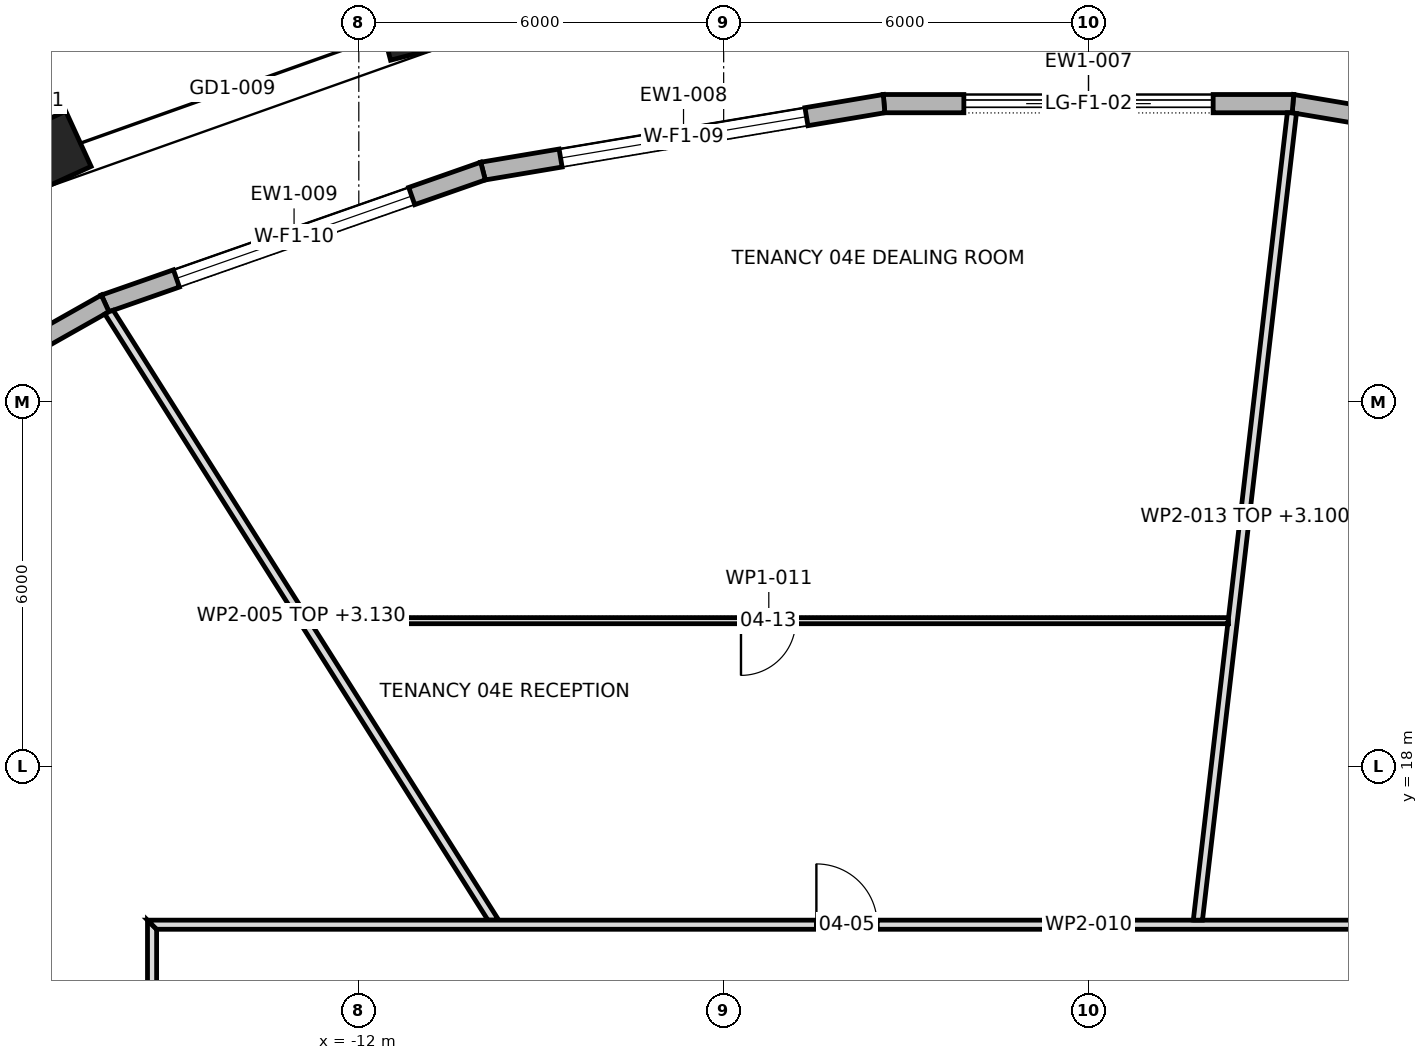
"""IFC4 building model, lengths in metres.
Left out: names, types, materials, properties, quantities, classifications, styles, units other than length and angle.
Written with IfcOpenShell. Run it as: python <this file> out.ifc"""

import sys

from ifc_helpers import new_model, si_unit, direction, frame, frame_2d, origin, origin_2d, place, context, subcontext, project, spatial, polyline, rectangle, outline, extrude, element, fill, save


model = new_model("IFC4")
c1 = context("Model", 3, precision=1e-05, world=origin(), true_north=direction((0.0, 1.0)))
c2 = subcontext(c1, "Body", "Model", "MODEL_VIEW")
j1 = project(units=[si_unit("LENGTHUNIT", "METRE"), si_unit("PLANEANGLEUNIT", "RADIAN")], contexts=[c1])
p1 = place(None, origin())
s1 = spatial("IfcSite", under=j1, at=p1, CompositionType="ELEMENT")
p2 = place(p1, origin())
s2 = spatial("IfcBuilding", under=s1, at=p2, CompositionType="ELEMENT")
p3 = place(p2, frame((0.0, 0.0, 61.3)))
s3 = spatial("IfcBuildingStorey", under=s2, at=p3, CompositionType="ELEMENT", Elevation=61.3)
for number, where, z_axis, x_axis in (
    (1, (-10.733, 30.327, 0.0), (0.0, 0.0, 1.0), (-0.968, -0.252, 0.0)),
    (2, (-17.429, 27.95, 0.0), (0.0, 0.0, 1.0), (-0.909, -0.417, 0.0)),
):
    element("IfcColumn", number, at=place(p3, frame(where, z_axis=z_axis, x_axis=x_axis)), inside=s3, PredefinedType="COLUMN", context=c2, shape_type="SweptSolid", body=[
        extrude(rectangle(XDim=1.8, YDim=1.0, at=origin_2d()), origin(), (0.0, 0.0, 1.0), 4.2),
    ])
p4 = place(p3, frame((9.958, 27.793, 0.0), z_axis=(0.0, 0.0, 1.0), x_axis=(-0.986153133093, 0.165837263877, 0.0)))
e3 = element("IfcWall", 3, at=p4, inside=s3, PredefinedType="STANDARD", context=c2, shape_type="SweptSolid", body=[
    extrude(outline(polyline([(-0.013, -0.15), (6.7, -0.15), (6.676, 0.15), (0.013, 0.15), (-0.013, -0.15)])), origin(), (0.0, 0.0, 1.0), 3.9),
])
p5 = place(p4, frame((1.294, 0.0, 0.6)))
e4 = element("IfcOpeningElement", 4, at=p5, cuts=e3, PredefinedType="OPENING", context=c2, shape_type="SweptSolid", body=[
    extrude(rectangle(XDim=4.1, YDim=2.85, at=frame_2d((2.05, 1.425))), frame((0.0, 0.162, 0.0), z_axis=(0.0, -1.0, 0.0), x_axis=(1.0, 0.0, 0.0)), (0.0, 0.0, 1.0), 0.324),
])
p6 = place(p3, frame((3.362, 28.903, 0.0), z_axis=(0.0, 0.0, 1.0), x_axis=(-1.0, 0.0, 0.0)))
e5 = element("IfcWall", 5, at=p6, inside=s3, PredefinedType="STANDARD", context=c2, shape_type="SweptSolid", body=[
    extrude(outline(polyline([(-0.012, -0.15), (6.737, -0.15), (6.712, 0.15), (0.012, 0.15), (-0.012, -0.15)])), origin(), (0.0, 0.0, 1.0), 3.9),
])
p7 = place(p6, frame((1.312, 0.0, 0.0)))
e6 = element("IfcOpeningElement", 6, at=p7, cuts=e5, PredefinedType="OPENING", context=c2, shape_type="SweptSolid", body=[
    extrude(rectangle(XDim=4.1, YDim=3.45, at=frame_2d((2.05, 1.725))), frame((0.0, 0.162, 0.0), z_axis=(0.0, -1.0, 0.0), x_axis=(1.0, 0.0, 0.0)), (0.0, 0.0, 1.0), 0.324),
])
p8 = place(p3, frame((-3.362, 28.903, 0.0), z_axis=(0.0, 0.0, 1.0), x_axis=(-0.986153133093, -0.165837263877, 0.0)))
e7 = element("IfcWall", 7, at=p8, inside=s3, PredefinedType="STANDARD", context=c2, shape_type="SweptSolid", body=[
    extrude(outline(polyline([(-0.012, -0.15), (6.701, -0.15), (6.675, 0.15), (0.012, 0.15), (-0.012, -0.15)])), origin(), (0.0, 0.0, 1.0), 3.9),
])
p9 = place(p8, frame((1.294, 0.0, 0.6)))
e8 = element("IfcOpeningElement", 8, at=p9, cuts=e7, PredefinedType="OPENING", context=c2, shape_type="SweptSolid", body=[
    extrude(rectangle(XDim=4.1, YDim=2.85, at=frame_2d((2.05, 1.425))), frame((0.0, 0.162, 0.0), z_axis=(0.0, -1.0, 0.0), x_axis=(1.0, 0.0, 0.0)), (0.0, 0.0, 1.0), 0.324),
])
p10 = place(p3, frame((-9.958, 27.793, 0.0), z_axis=(0.0, 0.0, 1.0), x_axis=(-0.94380689486, -0.330497420889, 0.0)))
e9 = element("IfcWall", 9, at=p10, inside=s3, PredefinedType="STANDARD", context=c2, shape_type="SweptSolid", body=[
    extrude(outline(polyline([(-0.013, -0.15), (6.597, -0.15), (6.571, 0.15), (0.013, 0.15), (-0.013, -0.15)])), origin(), (0.0, 0.0, 1.0), 3.9),
])
p11 = place(p10, frame((1.242, 0.0, 0.6)))
e10 = element("IfcOpeningElement", 10, at=p11, cuts=e9, PredefinedType="OPENING", context=c2, shape_type="SweptSolid", body=[
    extrude(rectangle(XDim=4.1, YDim=2.85, at=frame_2d((2.05, 1.425))), frame((0.0, 0.162, 0.0), z_axis=(0.0, -1.0, 0.0), x_axis=(1.0, 0.0, 0.0)), (0.0, 0.0, 1.0), 0.324),
])
p12 = place(p3, frame((-16.172, 25.617, 0.0), z_axis=(0.0, 0.0, 1.0), x_axis=(-0.870673928577, -0.491860661262, 0.0)))
e11 = element("IfcWall", 11, at=p12, inside=s3, PredefinedType="STANDARD", context=c2, shape_type="SweptSolid", body=[
    extrude(outline(polyline([(-0.013, -0.15), (6.439, -0.15), (6.411, 0.15), (0.013, 0.15), (-0.013, -0.15)])), origin(), (0.0, 0.0, 1.0), 3.9),
])
p13 = place(p12, frame((1.163, 0.0, 0.6)))
e12 = element("IfcOpeningElement", 12, at=p13, cuts=e11, PredefinedType="OPENING", context=c2, shape_type="SweptSolid", body=[
    extrude(rectangle(XDim=4.1, YDim=2.85, at=frame_2d((2.05, 1.425))), frame((0.0, 0.162, 0.0), z_axis=(0.0, -1.0, 0.0), x_axis=(1.0, 0.0, 0.0)), (0.0, 0.0, 1.0), 0.324),
])
p14 = place(p3, frame((-16.113, 25.482, 0.0), z_axis=(0.0, 0.0, 1.0), x_axis=(0.534334526362, -0.845273100209, 0.0)))
e13 = element("IfcWall", 13, at=p14, inside=s3, PredefinedType="PARTITIONING", context=c2, shape_type="SweptSolid", body=[
    extrude(outline(polyline([(0.0, -0.075), (1.965, -0.075), (3.93, -0.075), (5.896, -0.075), (7.861, -0.075), (9.826, -0.075), (11.791, -0.075), (11.886, 0.075), (11.886, 0.075), (9.964, 0.075), (8.041, 0.075), (6.119, 0.075), (6.118, 0.073), (6.115, 0.075), (4.591, 0.075), (3.068, 0.075), (1.544, 0.075), (0.02, 0.075), (0.003, 0.002), (0.0, -0.069), (0.0, -0.075)])), origin(), (0.0, 0.0, 1.0), 3.13),
])
p15 = place(p3, frame((-15.4, -2.12, 0.0), z_axis=(0.0, 0.0, 1.0), x_axis=(0.0, 1.0, 0.0)))
e14 = element("IfcWall", 14, at=p15, inside=s3, PredefinedType="PARTITIONING", context=c2, shape_type="SweptSolid", body=[
    extrude(outline(polyline([(0.0, -0.075), (1.938, -0.075), (3.877, -0.075), (5.815, -0.075), (7.753, -0.075), (9.692, -0.075), (11.63, -0.075), (13.568, -0.075), (15.507, -0.075), (17.445, -0.075), (17.595, 0.075), (15.64, 0.075), (13.685, 0.075), (11.73, 0.075), (9.775, 0.075), (7.82, 0.075), (5.865, 0.075), (3.91, 0.075), (1.955, 0.075), (0.0, 0.075), (0.0, -0.075)])), origin(), (0.0, 0.0, 1.0), 3.9),
])
p16 = place(p15, frame((12.4, 0.0, 0.0)))
e15 = element("IfcOpeningElement", 15, at=p16, cuts=e14, PredefinedType="OPENING", context=c2, shape_type="SweptSolid", body=[
    extrude(rectangle(XDim=1.8, YDim=2.1, at=frame_2d((0.9, 1.05))), frame((0.0, 0.087, 0.0), z_axis=(0.0, -1.0, 0.0), x_axis=(1.0, 0.0, 0.0)), (0.0, 0.0, 1.0), 0.174),
])
p17 = place(p15, frame((4.04, 0.0, 0.0)))
e16 = element("IfcOpeningElement", 16, at=p17, cuts=e14, PredefinedType="OPENING", context=c2, shape_type="SweptSolid", body=[
    extrude(rectangle(XDim=1.0, YDim=2.1, at=frame_2d((0.5, 1.05))), frame((0.0, 0.087, 0.0), z_axis=(0.0, -1.0, 0.0), x_axis=(1.0, 0.0, 0.0)), (0.0, 0.0, 1.0), 0.174),
])
p18 = place(p3, frame((-15.475, 15.4, 0.0), z_axis=(0.0, 0.0, 1.0), x_axis=(1.0, 0.0, 0.0)))
e17 = element("IfcWall", 17, at=p18, inside=s3, PredefinedType="PARTITIONING", context=c2, shape_type="SweptSolid", body=[
    extrude(outline(polyline([(0.15, -0.075), (2.066, -0.075), (3.981, -0.075), (5.897, -0.075), (7.812, -0.075), (9.728, -0.075), (11.644, -0.075), (13.56, -0.075), (15.475, -0.075), (17.391, -0.075), (19.306, -0.075), (21.222, -0.075), (23.138, -0.075), (25.053, -0.075), (26.969, -0.075), (28.885, -0.075), (30.8, -0.075), (30.95, 0.075), (29.016, 0.075), (27.081, 0.075), (25.147, 0.075), (23.212, 0.075), (21.278, 0.075), (19.344, 0.075), (17.409, 0.075), (15.475, 0.075), (13.541, 0.075), (11.606, 0.075), (9.672, 0.075), (7.738, 0.075), (5.803, 0.075), (3.869, 0.075), (1.935, 0.075), (0.0, 0.075), (0.15, -0.075)])), origin(), (0.0, 0.0, 1.0), 3.9),
])
p19 = place(p18, frame((22.945, 0.0, 0.0)))
e18 = element("IfcOpeningElement", 18, at=p19, cuts=e17, PredefinedType="OPENING", context=c2, shape_type="SweptSolid", body=[
    extrude(rectangle(XDim=1.8, YDim=2.1, at=frame_2d((0.9, 1.05))), frame((0.0, 0.087, 0.0), z_axis=(0.0, -1.0, 0.0), x_axis=(1.0, 0.0, 0.0)), (0.0, 0.0, 1.0), 0.174),
])
p20 = place(p18, frame((11.0, 0.0, 0.0)))
e19 = element("IfcOpeningElement", 19, at=p20, cuts=e17, PredefinedType="OPENING", context=c2, shape_type="SweptSolid", body=[
    extrude(rectangle(XDim=1.0, YDim=2.1, at=frame_2d((0.5, 1.05))), frame((0.0, 0.087, 0.0), z_axis=(0.0, -1.0, 0.0), x_axis=(1.0, 0.0, 0.0)), (0.0, 0.0, 1.0), 0.174),
])
p21 = place(p3, frame((-12.843, 20.4, 0.0), z_axis=(0.0, 0.0, 1.0), x_axis=(1.0, 0.0, 0.0)))
e20 = element("IfcWall", 20, at=p21, inside=s3, PredefinedType="PARTITIONING", context=c2, shape_type="SweptSolid", body=[
    extrude(outline(polyline([(0.063, -0.05), (1.947, -0.05), (3.831, -0.05), (5.714, -0.05), (7.598, -0.05), (9.482, -0.05), (11.366, -0.05), (13.25, -0.05), (15.134, -0.05), (15.146, 0.049), (15.146, 0.05), (13.252, 0.05), (11.359, 0.05), (9.466, 0.05), (7.573, 0.05), (5.68, 0.05), (3.786, 0.05), (1.893, 0.05), (0.0, 0.05), (0.0, 0.049), (0.063, -0.05)])), origin(), (0.0, 0.0, 1.0), 3.9),
])
p22 = place(p21, frame((7.128, 0.0, 0.0)))
e21 = element("IfcOpeningElement", 21, at=p22, cuts=e20, PredefinedType="OPENING", context=c2, shape_type="SweptSolid", body=[
    extrude(rectangle(XDim=0.9, YDim=2.1, at=frame_2d((0.45, 1.05))), frame((0.0, 0.062, 0.0), z_axis=(0.0, -1.0, 0.0), x_axis=(1.0, 0.0, 0.0)), (0.0, 0.0, 1.0), 0.124),
])
p23 = place(p3, frame((1.798, 15.467, 0.0), z_axis=(0.0, 0.0, 1.0), x_axis=(0.115693975805, 0.993284905736, 0.0)))
e22 = element("IfcWall", 22, at=p23, inside=s3, PredefinedType="PARTITIONING", context=c2, shape_type="SweptSolid", body=[
    extrude(outline(polyline([(13.373, -0.075), (13.373, 0.028), (13.367, 0.075), (11.695, 0.075), (10.022, 0.075), (8.35, 0.075), (6.678, 0.075), (5.005, 0.075), (4.909, 0.064), (4.908, 0.075), (3.272, 0.075), (1.636, 0.075), (0.0, 0.075), (0.0, 0.073), (0.017, -0.075), (1.925, -0.075), (3.833, -0.075), (5.741, -0.075), (7.649, -0.075), (9.557, -0.075), (11.465, -0.075), (13.373, -0.075)])), origin(), (0.0, 0.0, 1.0), 3.1),
])
p24 = place(p7, origin())
e23 = element("IfcDoor", 23, at=p24, inside=s3, OperationType="DOUBLE_DOOR_SLIDING", PredefinedType="DOOR", context=c2, shape_type="SweptSolid", body=[
    extrude(rectangle(XDim=4.1, YDim=3.45, at=frame_2d((2.05, 1.725))), frame((0.0, 0.025, 0.0), z_axis=(0.0, -1.0, 0.0), x_axis=(1.0, 0.0, 0.0)), (0.0, 0.0, 1.0), 0.05),
])
fill(e6, e23)
p25 = place(p9, origin())
e24 = element("IfcWindow", 24, at=p25, inside=s3, PartitioningType="TRIPLE_PANEL_VERTICAL", PredefinedType="WINDOW", context=c2, shape_type="SweptSolid", body=[
    extrude(rectangle(XDim=4.1, YDim=2.85, at=frame_2d((2.05, 1.425))), frame((0.0, 0.03, 0.0), z_axis=(0.0, -1.0, 0.0), x_axis=(1.0, 0.0, 0.0)), (0.0, 0.0, 1.0), 0.06),
])
fill(e8, e24)
p26 = place(p11, origin())
e25 = element("IfcWindow", 25, at=p26, inside=s3, PartitioningType="TRIPLE_PANEL_VERTICAL", PredefinedType="WINDOW", context=c2, shape_type="SweptSolid", body=[
    extrude(rectangle(XDim=4.1, YDim=2.85, at=frame_2d((2.05, 1.425))), frame((0.0, 0.03, 0.0), z_axis=(0.0, -1.0, 0.0), x_axis=(1.0, 0.0, 0.0)), (0.0, 0.0, 1.0), 0.06),
])
fill(e10, e25)
p27 = place(p20, origin())
e26 = element("IfcDoor", 26, at=p27, inside=s3, OperationType="SINGLE_SWING_RIGHT", PredefinedType="DOOR", context=c2, shape_type="SweptSolid", body=[
    extrude(rectangle(XDim=1.0, YDim=2.1, at=frame_2d((0.5, 1.05))), frame((0.0, 0.025, 0.0), z_axis=(0.0, -1.0, 0.0), x_axis=(1.0, 0.0, 0.0)), (0.0, 0.0, 1.0), 0.05),
])
fill(e19, e26)
p28 = place(p22, frame((0.9, 0.0, 0.0), z_axis=(0.0, 0.0, 1.0), x_axis=(-1.0, 0.0, 0.0)))
e27 = element("IfcDoor", 27, at=p28, inside=s3, OperationType="SINGLE_SWING_LEFT", PredefinedType="DOOR", context=c2, shape_type="SweptSolid", body=[
    extrude(rectangle(XDim=0.9, YDim=2.1, at=frame_2d((0.45, 1.05))), frame((0.0, 0.025, 0.0), z_axis=(0.0, -1.0, 0.0), x_axis=(1.0, 0.0, 0.0)), (0.0, 0.0, 1.0), 0.05),
])
fill(e21, e27)
save(model, sys.argv[1])
